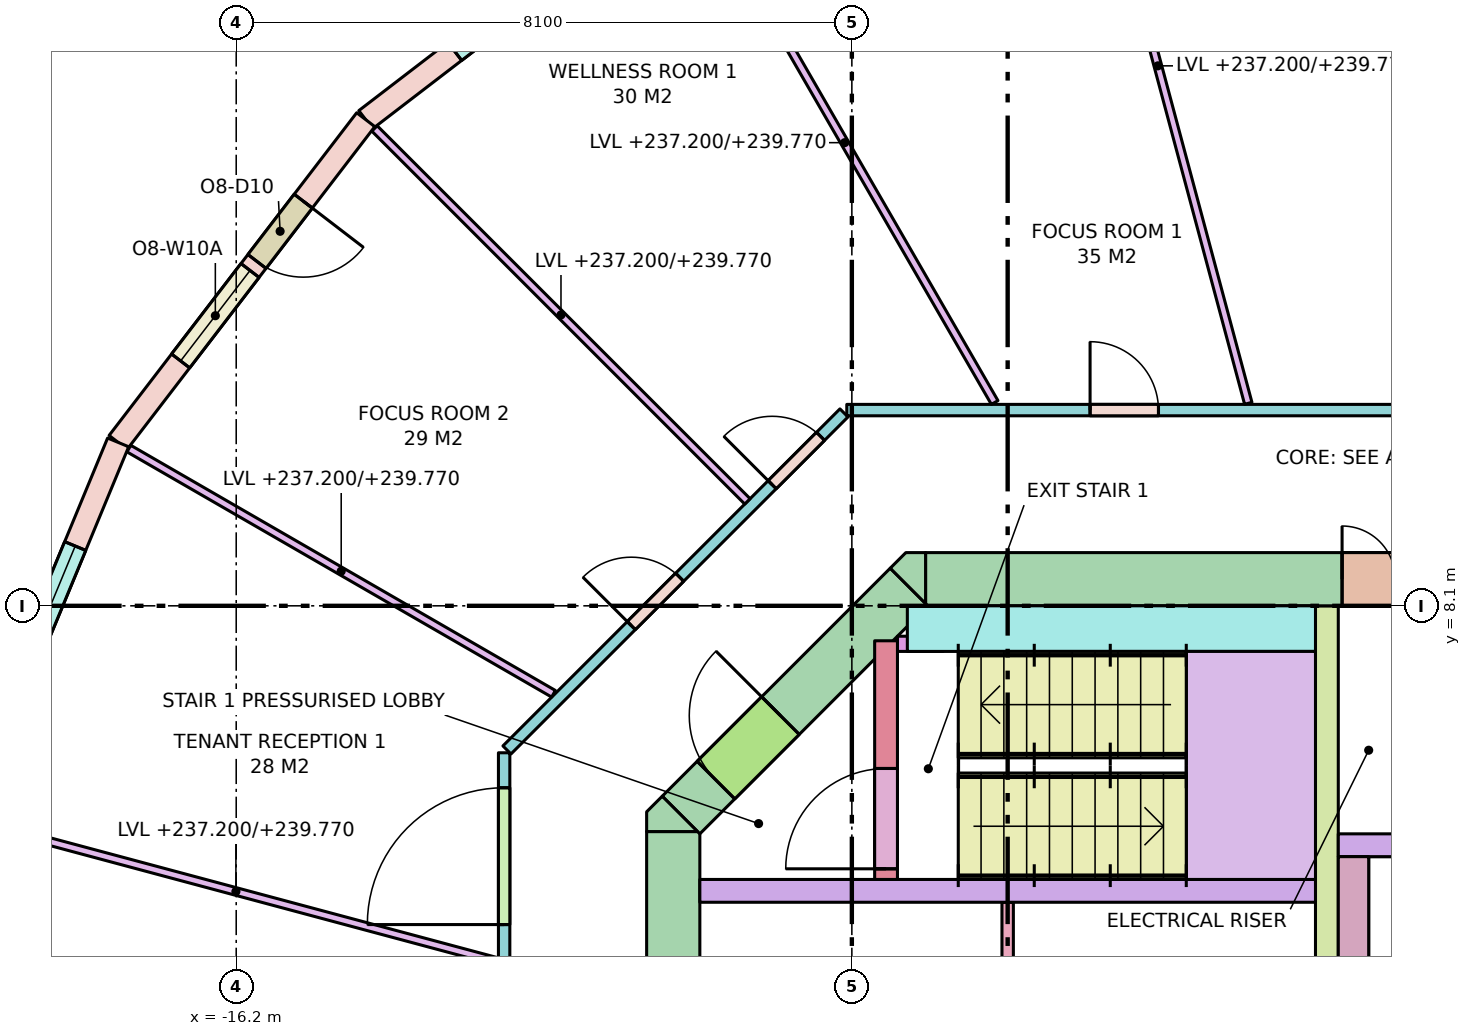
"""IFC4 building model, lengths in metres.
Left out: names, types, materials, properties, quantities, classifications, styles, units other than length and angle.
Written with IfcOpenShell. Run it as: python <this file> out.ifc"""

import sys

from ifc_helpers import new_model, si_unit, direction, frame, frame_2d, origin, place, context, subcontext, project, spatial, polyline, rectangle, outline, extrude, element, fill, save


model = new_model("IFC4")
c1 = context("Model", 3, precision=1e-05, world=origin(), true_north=direction((0.0, 1.0)))
c2 = subcontext(c1, "Body", "Model", "MODEL_VIEW")
j1 = project(units=[si_unit("LENGTHUNIT", "METRE"), si_unit("PLANEANGLEUNIT", "RADIAN")], contexts=[c1])
p1 = place(None, origin())
s1 = spatial("IfcSite", under=j1, at=p1, CompositionType="ELEMENT")
p2 = place(p1, origin())
s2 = spatial("IfcBuilding", under=s1, at=p2, CompositionType="ELEMENT")
p3 = place(p2, frame((0.0, 0.0, 237.2)))
s3 = spatial("IfcBuildingStorey", under=s2, at=p3, CompositionType="ELEMENT", Elevation=237.2)
p4 = place(p3, frame((-7.13, 8.45, -0.28), z_axis=(0.0, 0.0, 1.0), x_axis=(1.0, 0.0, 0.0)))
e1 = element("IfcWall", 1, at=p4, inside=s3, PredefinedType="SHEAR", context=c2, shape_type="SweptSolid", body=[
    extrude(rectangle(XDim=14.26, YDim=0.7, at=frame_2d((7.13, 0.0))), origin(), (0.0, 0.0, 1.0), 3.7),
])
p5 = place(p4, frame((5.48, 0.0, 0.28)))
e2 = element("IfcOpeningElement", 2, at=p5, cuts=e1, PredefinedType="OPENING", context=c2, shape_type="SweptSolid", body=[
    extrude(rectangle(XDim=0.7, YDim=2.1, at=frame_2d((0.35, 1.05))), frame((0.0, 0.36, 0.0), z_axis=(0.0, -1.0, 0.0), x_axis=(1.0, 0.0, 0.0)), (0.0, 0.0, 1.0), 0.72),
])
p6 = place(p4, frame((7.155, 0.0, 0.28)))
e3 = element("IfcOpeningElement", 3, at=p6, cuts=e1, PredefinedType="OPENING", context=c2, shape_type="SweptSolid", body=[
    extrude(rectangle(XDim=0.9, YDim=2.1, at=frame_2d((0.45, 1.05))), frame((0.0, 0.36, 0.0), z_axis=(0.0, -1.0, 0.0), x_axis=(1.0, 0.0, 0.0)), (0.0, 0.0, 1.0), 0.72),
])
p7 = place(p3, frame((-10.45, -5.13, -0.28), z_axis=(0.0, 0.0, 1.0), x_axis=(0.0, 1.0, 0.0)))
e4 = element("IfcWall", 4, at=p7, inside=s3, PredefinedType="SHEAR", context=c2, shape_type="SweptSolid", body=[
    extrude(rectangle(XDim=10.26, YDim=0.7, at=frame_2d((5.13, 0.0))), origin(), (0.0, 0.0, 1.0), 3.7),
])
p8 = place(p7, frame((4.13, 0.0, 0.28)))
e5 = element("IfcOpeningElement", 5, at=p8, cuts=e4, PredefinedType="OPENING", context=c2, shape_type="SweptSolid", body=[
    extrude(rectangle(XDim=2.0, YDim=2.1, at=frame_2d((1.0, 1.05))), frame((0.0, 0.36, 0.0), z_axis=(0.0, -1.0, 0.0), x_axis=(1.0, 0.0, 0.0)), (0.0, 0.0, 1.0), 0.72),
])
p9 = place(p3, frame((-10.347, 5.347, -0.28), z_axis=(0.0, 0.0, 1.0), x_axis=(0.707106781187, 0.707106781187, 0.0)))
e6 = element("IfcWall", 6, at=p9, inside=s3, PredefinedType="SHEAR", context=c2, shape_type="SweptSolid", body=[
    extrude(rectangle(XDim=4.243, YDim=0.7, at=frame_2d((2.121, 0.0))), origin(), (0.0, 0.0, 1.0), 3.7),
])
p10 = place(p9, frame((0.65, 0.0, 0.28)))
e7 = element("IfcOpeningElement", 7, at=p10, cuts=e6, PredefinedType="OPENING", context=c2, shape_type="SweptSolid", body=[
    extrude(rectangle(XDim=1.2, YDim=2.1, at=frame_2d((0.6, 1.05))), frame((0.0, 0.36, 0.0), z_axis=(0.0, -1.0, 0.0), x_axis=(1.0, 0.0, 0.0)), (0.0, 0.0, 1.0), 0.72),
])
p11 = place(p3, frame((0.0, 0.0, -0.28)))
e8 = element("IfcWall", 8, at=p11, inside=s3, PredefinedType="SHEAR", context=c2, shape_type="SweptSolid", body=[
    extrude(outline(polyline([(-10.595, 5.595), (-10.595, 5.595), (-10.595, 5.595), (-10.13, 5.13), (-10.8, 5.13), (-10.8, 5.13), (-10.8, 5.39), (-10.595, 5.595)])), origin(), (0.0, 0.0, 1.0), 3.7),
])
p12 = place(p3, frame((0.0, 0.0, -0.28)))
e9 = element("IfcWall", 9, at=p12, inside=s3, PredefinedType="SHEAR", context=c2, shape_type="SweptSolid", body=[
    extrude(outline(polyline([(-7.39, 8.8), (-7.13, 8.8), (-7.13, 8.8), (-7.13, 8.13), (-7.595, 8.595), (-7.595, 8.595), (-7.595, 8.595), (-7.39, 8.8)])), origin(), (0.0, 0.0, 1.0), 3.7),
])
p13 = place(p3, frame((-10.1, 4.35, 0.0), z_axis=(0.0, 0.0, 1.0), x_axis=(1.0, 0.0, 0.0)))
e10 = element("IfcWall", 10, at=p13, inside=s3, PredefinedType="SOLIDWALL", context=c2, shape_type="SweptSolid", body=[
    extrude(rectangle(XDim=8.1, YDim=0.3, at=frame_2d((4.05, 0.0))), origin(), (0.0, 0.0, 1.0), 3.42),
])
p14 = place(p3, frame((-1.85, 1.5, 0.0), z_axis=(0.0, 0.0, 1.0), x_axis=(0.0, 1.0, 0.0)))
e11 = element("IfcWall", 11, at=p14, inside=s3, PredefinedType="SHEAR", context=c2, shape_type="SweptSolid", body=[
    extrude(rectangle(XDim=6.6, YDim=0.3, at=frame_2d((3.3, 0.0))), origin(), (0.0, 0.0, 1.0), 3.42),
])
p15 = place(p3, frame((-1.5, 1.8, 0.0), z_axis=(0.0, 0.0, 1.0), x_axis=(0.0, 1.0, 0.0)))
e12 = element("IfcWall", 12, at=p15, inside=s3, PredefinedType="SOLIDWALL", context=c2, shape_type="SweptSolid", body=[
    extrude(rectangle(XDim=3.0, YDim=0.4, at=frame_2d((1.5, 0.0))), origin(), (0.0, 0.0, 1.0), 3.42),
])
p16 = place(p3, frame((-1.7, 4.95, 0.0), z_axis=(0.0, 0.0, 1.0), x_axis=(1.0, 0.0, 0.0)))
e13 = element("IfcWall", 13, at=p16, inside=s3, PredefinedType="SOLIDWALL", context=c2, shape_type="SweptSolid", body=[
    extrude(rectangle(XDim=3.4, YDim=0.3, at=frame_2d((1.7, 0.0))), origin(), (0.0, 0.0, 1.0), 3.42),
])
p17 = place(p3, frame((-7.65, 4.5, 0.0), z_axis=(0.0, 0.0, 1.0), x_axis=(0.0, 1.0, 0.0)))
e14 = element("IfcWall", 14, at=p17, inside=s3, PredefinedType="SHEAR", context=c2, shape_type="SweptSolid", body=[
    extrude(rectangle(XDim=3.14, YDim=0.3, at=frame_2d((1.57, 0.0))), origin(), (0.0, 0.0, 1.0), 3.42),
])
p18 = place(p17, frame((0.14, 0.0, 0.0)))
e15 = element("IfcOpeningElement", 15, at=p18, cuts=e14, PredefinedType="OPENING", context=c2, shape_type="SweptSolid", body=[
    extrude(rectangle(XDim=1.32, YDim=2.1, at=frame_2d((0.66, 1.05))), frame((0.0, 0.16, 0.0), z_axis=(0.0, -1.0, 0.0), x_axis=(1.0, 0.0, 0.0)), (0.0, 0.0, 1.0), 0.32),
])
p19 = place(p3, frame((-7.37, 7.8, 0.0), z_axis=(0.0, 0.0, 1.0), x_axis=(1.0, 0.0, 0.0)))
e16 = element("IfcWall", 16, at=p19, inside=s3, PredefinedType="SHEAR", context=c2, shape_type="SweptSolid", body=[
    extrude(rectangle(XDim=5.37, YDim=0.6, at=frame_2d((2.685, 0.0))), origin(), (0.0, 0.0, 1.0), 3.42),
])
p20 = place(p3, frame((-7.5, 7.6, 0.0), z_axis=(0.0, 0.0, 1.0), x_axis=(1.0, 0.0, 0.0)))
e17 = element("IfcWall", 17, at=p20, inside=s3, PredefinedType="SHEAR", context=c2, shape_type="SweptSolid", body=[
    extrude(rectangle(XDim=0.6, YDim=0.2, at=frame_2d((0.3, 0.0))), origin(), (0.0, 0.0, 1.0), 3.42),
])
p21 = place(p3, frame((-10.25, 17.753, 0.0), z_axis=(0.0, 0.0, 1.0), x_axis=(-0.793349293227, -0.60876670321, 0.0)))
e18 = element("IfcWall", 18, at=p21, inside=s3, PredefinedType="STANDARD", context=c2, shape_type="SweptSolid", body=[
    extrude(rectangle(XDim=5.352, YDim=0.3, at=frame_2d((2.676, 0.0))), origin(), (0.0, 0.0, 1.0), 3.42),
])
p22 = place(p21, frame((1.476, 0.0, 0.8)))
e19 = element("IfcOpeningElement", 19, at=p22, cuts=e18, PredefinedType="OPENING", context=c2, shape_type="SweptSolid", body=[
    extrude(rectangle(XDim=2.4, YDim=2.4, at=frame_2d((1.2, 1.2))), frame((0.0, 0.16, 0.0), z_axis=(0.0, -1.0, 0.0), x_axis=(1.0, 0.0, 0.0)), (0.0, 0.0, 1.0), 0.32),
])
p23 = place(p3, frame((-14.496, 14.496, 0.0), z_axis=(0.0, 0.0, 1.0), x_axis=(-0.60876670321, -0.793349293227, 0.0)))
e20 = element("IfcWall", 20, at=p23, inside=s3, PredefinedType="STANDARD", context=c2, shape_type="SweptSolid", body=[
    extrude(rectangle(XDim=5.352, YDim=0.3, at=frame_2d((2.676, 0.0))), origin(), (0.0, 0.0, 1.0), 3.42),
])
p24 = place(p23, frame((1.351, 0.0, 0.0)))
e21 = element("IfcOpeningElement", 21, at=p24, cuts=e20, PredefinedType="OPENING", context=c2, shape_type="SweptSolid", body=[
    extrude(rectangle(XDim=1.0, YDim=2.4, at=frame_2d((0.5, 1.2))), frame((0.0, 0.16, 0.0), z_axis=(0.0, -1.0, 0.0), x_axis=(1.0, 0.0, 0.0)), (0.0, 0.0, 1.0), 0.32),
])
p25 = place(p23, frame((2.501, 0.0, 0.8)))
e22 = element("IfcOpeningElement", 22, at=p25, cuts=e20, PredefinedType="OPENING", context=c2, shape_type="SweptSolid", body=[
    extrude(rectangle(XDim=1.5, YDim=2.4, at=frame_2d((0.75, 1.2))), frame((0.0, 0.16, 0.0), z_axis=(0.0, -1.0, 0.0), x_axis=(1.0, 0.0, 0.0)), (0.0, 0.0, 1.0), 0.32),
])
p26 = place(p3, frame((-17.753, 10.25, 0.0), z_axis=(0.0, 0.0, 1.0), x_axis=(-0.382713071139, -0.923867255172, 0.0)))
e23 = element("IfcWall", 23, at=p26, inside=s3, PredefinedType="STANDARD", context=c2, shape_type="SweptSolid", body=[
    extrude(rectangle(XDim=5.352, YDim=0.3, at=frame_2d((2.676, 0.0))), origin(), (0.0, 0.0, 1.0), 3.42),
])
p27 = place(p26, frame((1.476, 0.0, 0.8)))
e24 = element("IfcOpeningElement", 24, at=p27, cuts=e23, PredefinedType="OPENING", context=c2, shape_type="SweptSolid", body=[
    extrude(rectangle(XDim=2.4, YDim=2.4, at=frame_2d((1.2, 1.2))), frame((0.0, 0.16, 0.0), z_axis=(0.0, -1.0, 0.0), x_axis=(1.0, 0.0, 0.0)), (0.0, 0.0, 1.0), 0.32),
])
p28 = place(p3, frame((-6.05, 1.65, 0.0), z_axis=(0.0, 0.0, 1.0), x_axis=(0.0, 1.0, 0.0)))
e25 = element("IfcWall", 25, at=p28, inside=s3, PredefinedType="PARTITIONING", context=c2, shape_type="SweptSolid", body=[
    extrude(rectangle(XDim=2.55, YDim=0.15, at=frame_2d((1.275, 0.0))), origin(), (0.0, 0.0, 1.0), 3.42),
])
p29 = place(p3, frame((-12.675, -3.396, 0.0), z_axis=(0.0, 0.0, 1.0), x_axis=(0.0, 1.0, 0.0)))
e26 = element("IfcWall", 26, at=p29, inside=s3, PredefinedType="PARTITIONING", context=c2, shape_type="SweptSolid", body=[
    extrude(rectangle(XDim=9.563, YDim=0.15, at=frame_2d((4.781, 0.0))), origin(), (0.0, 0.0, 1.0), 2.57),
])
p30 = place(p29, frame((7.303, 0.0, 0.0)))
e27 = element("IfcOpeningElement", 27, at=p30, cuts=e26, PredefinedType="OPENING", context=c2, shape_type="SweptSolid", body=[
    extrude(rectangle(XDim=1.8, YDim=2.1, at=frame_2d((0.9, 1.05))), frame((0.0, 0.085, 0.0), z_axis=(0.0, -1.0, 0.0), x_axis=(1.0, 0.0, 0.0)), (0.0, 0.0, 1.0), 0.17),
])
p31 = place(p29, frame((4.645, 0.0, 0.0)))
e28 = element("IfcOpeningElement", 28, at=p31, cuts=e26, PredefinedType="OPENING", context=c2, shape_type="SweptSolid", body=[
    extrude(rectangle(XDim=0.9, YDim=2.1, at=frame_2d((0.45, 1.05))), frame((0.0, 0.085, 0.0), z_axis=(0.0, -1.0, 0.0), x_axis=(1.0, 0.0, 0.0)), (0.0, 0.0, 1.0), 0.17),
])
p32 = place(p29, frame((1.273, 0.0, 0.0)))
e29 = element("IfcOpeningElement", 29, at=p32, cuts=e26, PredefinedType="OPENING", context=c2, shape_type="SweptSolid", body=[
    extrude(rectangle(XDim=0.9, YDim=2.1, at=frame_2d((0.45, 1.05))), frame((0.0, 0.085, 0.0), z_axis=(0.0, -1.0, 0.0), x_axis=(1.0, 0.0, 0.0)), (0.0, 0.0, 1.0), 0.17),
])
p33 = place(p3, frame((-12.638, 6.204, 0.0), z_axis=(0.0, 0.0, 1.0), x_axis=(0.707106781187, 0.707106781187, 0.0)))
e30 = element("IfcWall", 30, at=p33, inside=s3, PredefinedType="PARTITIONING", context=c2, shape_type="SweptSolid", body=[
    extrude(rectangle(XDim=6.271, YDim=0.15, at=frame_2d((3.135, 0.0))), origin(), (0.0, 0.0, 1.0), 2.57),
])
p34 = place(p33, frame((4.935, 0.0, 0.0)))
e31 = element("IfcOpeningElement", 31, at=p34, cuts=e30, PredefinedType="OPENING", context=c2, shape_type="SweptSolid", body=[
    extrude(rectangle(XDim=0.9, YDim=2.1, at=frame_2d((0.45, 1.05))), frame((0.0, 0.085, 0.0), z_axis=(0.0, -1.0, 0.0), x_axis=(1.0, 0.0, 0.0)), (0.0, 0.0, 1.0), 0.17),
])
p35 = place(p33, frame((2.314, 0.0, 0.0)))
e32 = element("IfcOpeningElement", 32, at=p35, cuts=e30, PredefinedType="OPENING", context=c2, shape_type="SweptSolid", body=[
    extrude(rectangle(XDim=0.9, YDim=2.1, at=frame_2d((0.45, 1.05))), frame((0.0, 0.085, 0.0), z_axis=(0.0, -1.0, 0.0), x_axis=(1.0, 0.0, 0.0)), (0.0, 0.0, 1.0), 0.17),
])
p36 = place(p3, frame((-8.167, 10.675, 0.0), z_axis=(0.0, 0.0, 1.0), x_axis=(1.0, 0.0, 0.0)))
e33 = element("IfcWall", 33, at=p36, inside=s3, PredefinedType="PARTITIONING", context=c2, shape_type="SweptSolid", body=[
    extrude(rectangle(XDim=16.333, YDim=0.15, at=frame_2d((8.167, 0.0))), origin(), (0.0, 0.0, 1.0), 2.57),
])
p37 = place(p36, frame((12.232, 0.0, 0.0)))
e34 = element("IfcOpeningElement", 34, at=p37, cuts=e33, PredefinedType="OPENING", context=c2, shape_type="SweptSolid", body=[
    extrude(rectangle(XDim=0.9, YDim=2.1, at=frame_2d((0.45, 1.05))), frame((0.0, 0.085, 0.0), z_axis=(0.0, -1.0, 0.0), x_axis=(1.0, 0.0, 0.0)), (0.0, 0.0, 1.0), 0.17),
])
p38 = place(p36, frame((7.667, 0.0, 0.0)))
e35 = element("IfcOpeningElement", 35, at=p38, cuts=e33, PredefinedType="OPENING", context=c2, shape_type="SweptSolid", body=[
    extrude(rectangle(XDim=1.0, YDim=2.1, at=frame_2d((0.5, 1.05))), frame((0.0, 0.085, 0.0), z_axis=(0.0, -1.0, 0.0), x_axis=(1.0, 0.0, 0.0)), (0.0, 0.0, 1.0), 0.17),
])
p39 = place(p36, frame((3.201, 0.0, 0.0)))
e36 = element("IfcOpeningElement", 36, at=p39, cuts=e33, PredefinedType="OPENING", context=c2, shape_type="SweptSolid", body=[
    extrude(rectangle(XDim=0.9, YDim=2.1, at=frame_2d((0.45, 1.05))), frame((0.0, 0.085, 0.0), z_axis=(0.0, -1.0, 0.0), x_axis=(1.0, 0.0, 0.0)), (0.0, 0.0, 1.0), 0.17),
])
p40 = place(p3, frame((-2.884, 10.764, 0.0), z_axis=(0.0, 0.0, 1.0), x_axis=(-0.258811310764, 0.965927898666, 0.0)))
e37 = element("IfcWall", 37, at=p40, inside=s3, PredefinedType="PARTITIONING", context=c2, shape_type="SweptSolid", body=[
    extrude(rectangle(XDim=9.193, YDim=0.1, at=frame_2d((4.596, 0.0))), origin(), (0.0, 0.0, 1.0), 2.57),
])
p41 = place(p3, frame((-6.221, 10.775, 0.0), z_axis=(0.0, 0.0, 1.0), x_axis=(-0.500016891966, 0.866015650984, 0.0)))
e38 = element("IfcWall", 38, at=p41, inside=s3, PredefinedType="PARTITIONING", context=c2, shape_type="SweptSolid", body=[
    extrude(rectangle(XDim=7.895, YDim=0.1, at=frame_2d((3.948, 0.0))), origin(), (0.0, 0.0, 1.0), 2.57),
])
p42 = place(p3, frame((-9.474, 9.474, 0.0), z_axis=(0.0, 0.0, 1.0), x_axis=(-0.707106781187, 0.707106781187, 0.0)))
e39 = element("IfcWall", 39, at=p42, inside=s3, PredefinedType="PARTITIONING", context=c2, shape_type="SweptSolid", body=[
    extrude(rectangle(XDim=6.938, YDim=0.1, at=frame_2d((3.469, 0.0))), origin(), (0.0, 0.0, 1.0), 2.57),
])
p43 = place(p3, frame((-12.025, 6.943, 0.0), z_axis=(0.0, 0.0, 1.0), x_axis=(-0.866026773083, 0.499997628298, 0.0)))
e40 = element("IfcWall", 40, at=p43, inside=s3, PredefinedType="PARTITIONING", context=c2, shape_type="SweptSolid", body=[
    extrude(rectangle(XDim=6.451, YDim=0.1, at=frame_2d((3.226, 0.0))), origin(), (0.0, 0.0, 1.0), 2.57),
])
p44 = place(p3, frame((-12.764, 3.42, 0.0), z_axis=(0.0, 0.0, 1.0), x_axis=(-0.965928160208, 0.258810334643, 0.0)))
e41 = element("IfcWall", 41, at=p44, inside=s3, PredefinedType="PARTITIONING", context=c2, shape_type="SweptSolid", body=[
    extrude(rectangle(XDim=7.122, YDim=0.1, at=frame_2d((3.561, 0.0))), origin(), (0.0, 0.0, 1.0), 2.57),
])
p45 = place(p22, origin())
e42 = element("IfcWindow", 42, at=p45, inside=s3, PartitioningType="SINGLE_PANEL", PredefinedType="WINDOW", context=c2, shape_type="SweptSolid", body=[
    extrude(rectangle(XDim=2.4, YDim=2.4, at=frame_2d((1.2, 1.2))), frame((0.0, 0.03, 0.0), z_axis=(0.0, -1.0, 0.0), x_axis=(1.0, 0.0, 0.0)), (0.0, 0.0, 1.0), 0.06),
])
fill(e19, e42)
p46 = place(p24, origin())
e43 = element("IfcDoor", 43, at=p46, inside=s3, OperationType="SINGLE_SWING_LEFT", PredefinedType="DOOR", context=c2, shape_type="SweptSolid", body=[
    extrude(rectangle(XDim=1.0, YDim=2.4, at=frame_2d((0.5, 1.2))), frame((0.0, 0.025, 0.0), z_axis=(0.0, -1.0, 0.0), x_axis=(1.0, 0.0, 0.0)), (0.0, 0.0, 1.0), 0.05),
])
fill(e21, e43)
p47 = place(p25, origin())
e44 = element("IfcWindow", 44, at=p47, inside=s3, PartitioningType="SINGLE_PANEL", PredefinedType="WINDOW", context=c2, shape_type="SweptSolid", body=[
    extrude(rectangle(XDim=1.5, YDim=2.4, at=frame_2d((0.75, 1.2))), frame((0.0, 0.03, 0.0), z_axis=(0.0, -1.0, 0.0), x_axis=(1.0, 0.0, 0.0)), (0.0, 0.0, 1.0), 0.06),
])
fill(e22, e44)
p48 = place(p27, origin())
e45 = element("IfcWindow", 45, at=p48, inside=s3, PartitioningType="SINGLE_PANEL", PredefinedType="WINDOW", context=c2, shape_type="SweptSolid", body=[
    extrude(rectangle(XDim=2.4, YDim=2.4, at=frame_2d((1.2, 1.2))), frame((0.0, 0.03, 0.0), z_axis=(0.0, -1.0, 0.0), x_axis=(1.0, 0.0, 0.0)), (0.0, 0.0, 1.0), 0.06),
])
fill(e24, e45)
p49 = place(p18, origin())
e46 = element("IfcDoor", 46, at=p49, inside=s3, OperationType="DOUBLE_DOOR_SINGLE_SWING", PredefinedType="DOOR", context=c2, shape_type="SweptSolid", body=[
    extrude(rectangle(XDim=1.32, YDim=2.1, at=frame_2d((0.66, 1.05))), frame((0.0, 0.025, 0.0), z_axis=(0.0, -1.0, 0.0), x_axis=(1.0, 0.0, 0.0)), (0.0, 0.0, 1.0), 0.05),
])
fill(e15, e46)
p50 = place(p10, origin())
e47 = element("IfcDoor", 47, at=p50, inside=s3, OperationType="SINGLE_SWING_RIGHT", PredefinedType="DOOR", context=c2, shape_type="SweptSolid", body=[
    extrude(rectangle(XDim=1.2, YDim=2.1, at=frame_2d((0.6, 1.05))), frame((0.0, 0.025, 0.0), z_axis=(0.0, -1.0, 0.0), x_axis=(1.0, 0.0, 0.0)), (0.0, 0.0, 1.0), 0.05),
])
fill(e7, e47)
p51 = place(p5, origin())
e48 = element("IfcDoor", 48, at=p51, inside=s3, OperationType="SINGLE_SWING_LEFT", PredefinedType="DOOR", context=c2, shape_type="SweptSolid", body=[
    extrude(rectangle(XDim=0.7, YDim=2.1, at=frame_2d((0.35, 1.05))), frame((0.0, 0.025, 0.0), z_axis=(0.0, -1.0, 0.0), x_axis=(1.0, 0.0, 0.0)), (0.0, 0.0, 1.0), 0.05),
])
fill(e2, e48)
p52 = place(p39, origin())
e49 = element("IfcDoor", 49, at=p52, inside=s3, OperationType="SINGLE_SWING_LEFT", PredefinedType="DOOR", context=c2, shape_type="SweptSolid", body=[
    extrude(rectangle(XDim=0.9, YDim=2.1, at=frame_2d((0.45, 1.05))), frame((0.0, 0.025, 0.0), z_axis=(0.0, -1.0, 0.0), x_axis=(1.0, 0.0, 0.0)), (0.0, 0.0, 1.0), 0.05),
])
fill(e36, e49)
p53 = place(p34, origin())
e50 = element("IfcDoor", 50, at=p53, inside=s3, OperationType="SINGLE_SWING_LEFT", PredefinedType="DOOR", context=c2, shape_type="SweptSolid", body=[
    extrude(rectangle(XDim=0.9, YDim=2.1, at=frame_2d((0.45, 1.05))), frame((0.0, 0.025, 0.0), z_axis=(0.0, -1.0, 0.0), x_axis=(1.0, 0.0, 0.0)), (0.0, 0.0, 1.0), 0.05),
])
fill(e31, e50)
p54 = place(p35, origin())
e51 = element("IfcDoor", 51, at=p54, inside=s3, OperationType="SINGLE_SWING_LEFT", PredefinedType="DOOR", context=c2, shape_type="SweptSolid", body=[
    extrude(rectangle(XDim=0.9, YDim=2.1, at=frame_2d((0.45, 1.05))), frame((0.0, 0.025, 0.0), z_axis=(0.0, -1.0, 0.0), x_axis=(1.0, 0.0, 0.0)), (0.0, 0.0, 1.0), 0.05),
])
fill(e32, e51)
p55 = place(p30, origin())
e52 = element("IfcDoor", 52, at=p55, inside=s3, OperationType="DOUBLE_DOOR_SINGLE_SWING", PredefinedType="DOOR", context=c2, shape_type="SweptSolid", body=[
    extrude(rectangle(XDim=1.8, YDim=2.1, at=frame_2d((0.9, 1.05))), frame((0.0, 0.025, 0.0), z_axis=(0.0, -1.0, 0.0), x_axis=(1.0, 0.0, 0.0)), (0.0, 0.0, 1.0), 0.05),
])
fill(e27, e52)
save(model, sys.argv[1])
